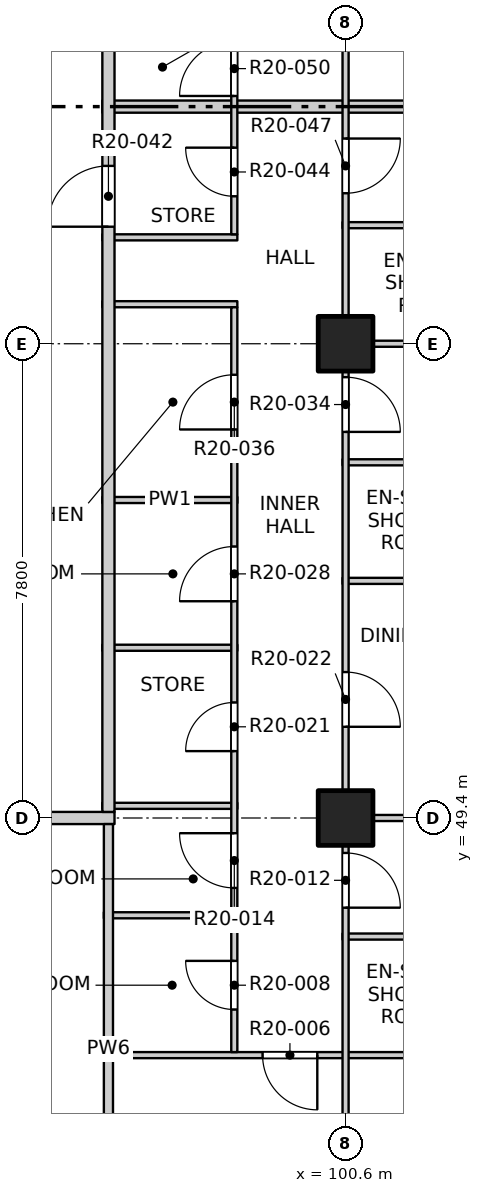
"""IFC4 building model, lengths in metres.
Left out: names, types, materials, properties, quantities, classifications, styles, units other than length and angle.
Written with IfcOpenShell. Run it as: python <this file> out.ifc"""

import sys

from ifc_helpers import new_model, si_unit, direction, frame, frame_2d, origin, origin_2d, place, context, subcontext, project, spatial, rectangle, extrude, element, fill, save


model = new_model("IFC4")
c1 = context("Model", 3, precision=1e-05, world=origin(), true_north=direction((0.0, 1.0)))
c2 = subcontext(c1, "Body", "Model", "MODEL_VIEW")
j1 = project(units=[si_unit("LENGTHUNIT", "METRE"), si_unit("PLANEANGLEUNIT", "RADIAN")], contexts=[c1])
p1 = place(None, origin())
s1 = spatial("IfcSite", under=j1, at=p1, CompositionType="ELEMENT")
p2 = place(p1, origin())
s2 = spatial("IfcBuilding", under=s1, at=p2, CompositionType="ELEMENT")
p3 = place(p2, frame((0.0, 0.0, 204.1)))
s3 = spatial("IfcBuildingStorey", under=s2, at=p3, CompositionType="ELEMENT", Elevation=204.1)
for number, where, z_axis, x_axis in (
    (1, (100.6, 49.4, -0.25), (0.0, 0.0, 1.0), (1.0, 0.0, 0.0)),
    (2, (100.6, 57.2, -0.25), (0.0, 0.0, 1.0), (1.0, 0.0, 0.0)),
):
    element("IfcColumn", number, at=place(p3, frame(where, z_axis=z_axis, x_axis=x_axis)), inside=s3, PredefinedType="COLUMN", context=c2, shape_type="SweptSolid", body=[
        extrude(rectangle(XDim=0.9, YDim=0.9, at=origin_2d()), origin(), (0.0, 0.0, 1.0), 3.4),
    ])
p4 = place(p3, frame((96.625, 45.5, 0.0), z_axis=(0.0, 0.0, 1.0), x_axis=(1.0, 0.0, 0.0)))
e3 = element("IfcWall", 3, at=p4, inside=s3, PredefinedType="PARTITIONING", context=c2, shape_type="SweptSolid", body=[
    extrude(rectangle(XDim=11.475, YDim=0.1, at=frame_2d((5.738, 0.0))), origin(), (0.0, 0.0, 1.0), 3.15),
])
p5 = place(p4, frame((2.61, 0.0, 0.0)))
e4 = element("IfcOpeningElement", 4, at=p5, cuts=e3, PredefinedType="OPENING", context=c2, shape_type="SweptSolid", body=[
    extrude(rectangle(XDim=0.9, YDim=2.1, at=frame_2d((0.45, 1.05))), frame((0.0, 0.06, 0.0), z_axis=(0.0, -1.0, 0.0), x_axis=(1.0, 0.0, 0.0)), (0.0, 0.0, 1.0), 0.12),
])
p6 = place(p3, frame((100.55, 47.45, 0.0), z_axis=(0.0, 0.0, 1.0), x_axis=(1.0, 0.0, 0.0)))
e5 = element("IfcWall", 5, at=p6, inside=s3, PredefinedType="PARTITIONING", context=c2, shape_type="SweptSolid", body=[
    extrude(rectangle(XDim=3.4, YDim=0.1, at=frame_2d((1.7, 0.0))), origin(), (0.0, 0.0, 1.0), 3.15),
])
p7 = place(p3, frame((96.625, 47.8, 0.0), z_axis=(0.0, 0.0, 1.0), x_axis=(1.0, 0.0, 0.0)))
e6 = element("IfcWall", 6, at=p7, inside=s3, PredefinedType="PARTITIONING", context=c2, shape_type="SweptSolid", body=[
    extrude(rectangle(XDim=2.195, YDim=0.1, at=frame_2d((1.098, 0.0))), origin(), (0.0, 0.0, 1.0), 3.15),
])
p8 = place(p3, frame((73.2, 49.4, 0.0), z_axis=(0.0, 0.0, 1.0), x_axis=(1.0, 0.0, 0.0)))
e7 = element("IfcWall", 7, at=p8, inside=s3, PredefinedType="PARTITIONING", context=c2, shape_type="SweptSolid", body=[
    extrude(rectangle(XDim=23.6, YDim=0.2, at=frame_2d((11.8, 0.0))), origin(), (0.0, 0.0, 1.0), 3.15),
])
p9 = place(p8, frame((1.6, 0.0, 0.0)))
e8 = element("IfcOpeningElement", 8, at=p9, cuts=e7, PredefinedType="OPENING", context=c2, shape_type="SweptSolid", body=[
    extrude(rectangle(XDim=0.9, YDim=2.1, at=frame_2d((0.45, 1.05))), frame((0.0, 0.11, 0.0), z_axis=(0.0, -1.0, 0.0), x_axis=(1.0, 0.0, 0.0)), (0.0, 0.0, 1.0), 0.22),
])
p10 = place(p8, frame((5.5, 0.0, 0.0)))
e9 = element("IfcOpeningElement", 9, at=p10, cuts=e7, PredefinedType="OPENING", context=c2, shape_type="SweptSolid", body=[
    extrude(rectangle(XDim=0.9, YDim=2.1, at=frame_2d((0.45, 1.05))), frame((0.0, 0.11, 0.0), z_axis=(0.0, -1.0, 0.0), x_axis=(1.0, 0.0, 0.0)), (0.0, 0.0, 1.0), 0.22),
])
p11 = place(p8, frame((12.375, 0.0, 0.0)))
e10 = element("IfcOpeningElement", 10, at=p11, cuts=e7, PredefinedType="OPENING", context=c2, shape_type="SweptSolid", body=[
    extrude(rectangle(XDim=1.2, YDim=2.1, at=frame_2d((0.6, 1.05))), frame((0.0, 0.11, 0.0), z_axis=(0.0, -1.0, 0.0), x_axis=(1.0, 0.0, 0.0)), (0.0, 0.0, 1.0), 0.22),
])
p12 = place(p8, frame((20.15, 0.0, 0.0)))
e11 = element("IfcOpeningElement", 11, at=p12, cuts=e7, PredefinedType="OPENING", context=c2, shape_type="SweptSolid", body=[
    extrude(rectangle(XDim=1.2, YDim=2.1, at=frame_2d((0.6, 1.05))), frame((0.0, 0.11, 0.0), z_axis=(0.0, -1.0, 0.0), x_axis=(1.0, 0.0, 0.0)), (0.0, 0.0, 1.0), 0.22),
])
p13 = place(p3, frame((100.55, 49.4, 0.0), z_axis=(0.0, 0.0, 1.0), x_axis=(1.0, 0.0, 0.0)))
e12 = element("IfcWall", 12, at=p13, inside=s3, PredefinedType="PARTITIONING", context=c2, shape_type="SweptSolid", body=[
    extrude(rectangle(XDim=7.55, YDim=0.1, at=frame_2d((3.775, 0.0))), origin(), (0.0, 0.0, 1.0), 3.15),
])
for number, where, z_axis, x_axis in (
    (13, (96.6, 49.6, 0.0), (0.0, 0.0, 1.0), (1.0, 0.0, 0.0)),
    (14, (96.6, 52.2, 0.0), (0.0, 0.0, 1.0), (1.0, 0.0, 0.0)),
):
    element("IfcWall", number, at=place(p3, frame(where, z_axis=z_axis, x_axis=x_axis)), inside=s3, PredefinedType="PARTITIONING", context=c2, shape_type="SweptSolid", body=[
        extrude(rectangle(XDim=2.22, YDim=0.1, at=frame_2d((1.11, 0.0))), origin(), (0.0, 0.0, 1.0), 3.15),
    ])
p14 = place(p3, frame((100.55, 53.3, 0.0), z_axis=(0.0, 0.0, 1.0), x_axis=(1.0, 0.0, 0.0)))
e15 = element("IfcWall", 15, at=p14, inside=s3, PredefinedType="PARTITIONING", context=c2, shape_type="SweptSolid", body=[
    extrude(rectangle(XDim=7.55, YDim=0.1, at=frame_2d((3.775, 0.0))), origin(), (0.0, 0.0, 1.0), 3.15),
])
p15 = place(p3, frame((96.6, 54.63, 0.0), z_axis=(0.0, 0.0, 1.0), x_axis=(1.0, 0.0, 0.0)))
e16 = element("IfcWall", 16, at=p15, inside=s3, PredefinedType="PARTITIONING", context=c2, shape_type="SweptSolid", body=[
    extrude(rectangle(XDim=2.22, YDim=0.1, at=frame_2d((1.11, 0.0))), origin(), (0.0, 0.0, 1.0), 3.15),
])
p16 = place(p3, frame((100.55, 55.25, 0.0), z_axis=(0.0, 0.0, 1.0), x_axis=(1.0, 0.0, 0.0)))
e17 = element("IfcWall", 17, at=p16, inside=s3, PredefinedType="PARTITIONING", context=c2, shape_type="SweptSolid", body=[
    extrude(rectangle(XDim=3.4, YDim=0.1, at=frame_2d((1.7, 0.0))), origin(), (0.0, 0.0, 1.0), 3.15),
])
p17 = place(p3, frame((100.55, 57.2, 0.0), z_axis=(0.0, 0.0, 1.0), x_axis=(1.0, 0.0, 0.0)))
e18 = element("IfcWall", 18, at=p17, inside=s3, PredefinedType="PARTITIONING", context=c2, shape_type="SweptSolid", body=[
    extrude(rectangle(XDim=7.55, YDim=0.1, at=frame_2d((3.775, 0.0))), origin(), (0.0, 0.0, 1.0), 3.15),
])
for number, where, z_axis, x_axis in (
    (19, (96.6, 57.85, 0.0), (0.0, 0.0, 1.0), (1.0, 0.0, 0.0)),
    (20, (96.6, 58.95, 0.0), (0.0, 0.0, 1.0), (1.0, 0.0, 0.0)),
):
    element("IfcWall", number, at=place(p3, frame(where, z_axis=z_axis, x_axis=x_axis)), inside=s3, PredefinedType="PARTITIONING", context=c2, shape_type="SweptSolid", body=[
        extrude(rectangle(XDim=2.22, YDim=0.1, at=frame_2d((1.11, 0.0))), origin(), (0.0, 0.0, 1.0), 3.15),
    ])
p18 = place(p3, frame((100.55, 59.15, 0.0), z_axis=(0.0, 0.0, 1.0), x_axis=(1.0, 0.0, 0.0)))
e21 = element("IfcWall", 21, at=p18, inside=s3, PredefinedType="PARTITIONING", context=c2, shape_type="SweptSolid", body=[
    extrude(rectangle(XDim=3.4, YDim=0.1, at=frame_2d((1.7, 0.0))), origin(), (0.0, 0.0, 1.0), 3.15),
])
p19 = place(p3, frame((96.6, 61.1, 0.0), z_axis=(0.0, 0.0, 1.0), x_axis=(1.0, 0.0, 0.0)))
e22 = element("IfcWall", 22, at=p19, inside=s3, PredefinedType="PARTITIONING", context=c2, shape_type="SweptSolid", body=[
    extrude(rectangle(XDim=11.5, YDim=0.2, at=frame_2d((5.75, 0.0))), origin(), (0.0, 0.0, 1.0), 2.55),
])
p20 = place(p3, frame((96.7, 41.9, 0.0), z_axis=(0.0, 0.0, 1.0), x_axis=(0.0, 1.0, 0.0)))
e23 = element("IfcWall", 23, at=p20, inside=s3, PredefinedType="PARTITIONING", context=c2, shape_type="SweptSolid", body=[
    extrude(rectangle(XDim=7.4, YDim=0.15, at=frame_2d((3.7, 0.0))), origin(), (0.0, 0.0, 1.0), 3.15),
])
p21 = place(p3, frame((96.7, 49.5, 0.0), z_axis=(0.0, 0.0, 1.0), x_axis=(0.0, 1.0, 0.0)))
e24 = element("IfcWall", 24, at=p21, inside=s3, PredefinedType="PARTITIONING", context=c2, shape_type="SweptSolid", body=[
    extrude(rectangle(XDim=34.9, YDim=0.2, at=frame_2d((17.45, 0.0))), origin(), (0.0, 0.0, 1.0), 3.15),
])
p22 = place(p21, frame((9.625, 0.0, 0.0)))
e25 = element("IfcOpeningElement", 25, at=p22, cuts=e24, PredefinedType="OPENING", context=c2, shape_type="SweptSolid", body=[
    extrude(rectangle(XDim=1.0, YDim=2.1, at=frame_2d((0.5, 1.05))), frame((0.0, 0.11, 0.0), z_axis=(0.0, -1.0, 0.0), x_axis=(1.0, 0.0, 0.0)), (0.0, 0.0, 1.0), 0.22),
])
p23 = place(p21, frame((14.125, 0.0, 0.0)))
e26 = element("IfcOpeningElement", 26, at=p23, cuts=e24, PredefinedType="OPENING", context=c2, shape_type="SweptSolid", body=[
    extrude(rectangle(XDim=1.0, YDim=2.1, at=frame_2d((0.5, 1.05))), frame((0.0, 0.11, 0.0), z_axis=(0.0, -1.0, 0.0), x_axis=(1.0, 0.0, 0.0)), (0.0, 0.0, 1.0), 0.22),
])
p24 = place(p21, frame((29.275, 0.0, 0.0)))
e27 = element("IfcOpeningElement", 27, at=p24, cuts=e24, PredefinedType="OPENING", context=c2, shape_type="SweptSolid", body=[
    extrude(rectangle(XDim=1.0, YDim=2.1, at=frame_2d((0.5, 1.05))), frame((0.0, 0.11, 0.0), z_axis=(0.0, -1.0, 0.0), x_axis=(1.0, 0.0, 0.0)), (0.0, 0.0, 1.0), 0.22),
])
p25 = place(p3, frame((98.77, 45.55, 0.0), z_axis=(0.0, 0.0, 1.0), x_axis=(0.0, 1.0, 0.0)))
e28 = element("IfcWall", 28, at=p25, inside=s3, PredefinedType="PARTITIONING", context=c2, shape_type="SweptSolid", body=[
    extrude(rectangle(XDim=12.25, YDim=0.1, at=frame_2d((6.125, 0.0))), origin(), (0.0, 0.0, 1.0), 3.15),
])
p26 = place(p25, frame((0.7, 0.0, 0.0)))
e29 = element("IfcOpeningElement", 29, at=p26, cuts=e28, PredefinedType="OPENING", context=c2, shape_type="SweptSolid", body=[
    extrude(rectangle(XDim=0.8, YDim=2.1, at=frame_2d((0.4, 1.05))), frame((0.0, 0.06, 0.0), z_axis=(0.0, -1.0, 0.0), x_axis=(1.0, 0.0, 0.0)), (0.0, 0.0, 1.0), 0.12),
])
p27 = place(p25, frame((2.7, 0.0, 0.0)))
e30 = element("IfcOpeningElement", 30, at=p27, cuts=e28, PredefinedType="OPENING", context=c2, shape_type="SweptSolid", body=[
    extrude(rectangle(XDim=0.9, YDim=2.1, at=frame_2d((0.45, 1.05))), frame((0.0, 0.06, 0.0), z_axis=(0.0, -1.0, 0.0), x_axis=(1.0, 0.0, 0.0)), (0.0, 0.0, 1.0), 0.12),
])
p28 = place(p25, frame((4.95, 0.0, 0.0)))
e31 = element("IfcOpeningElement", 31, at=p28, cuts=e28, PredefinedType="OPENING", context=c2, shape_type="SweptSolid", body=[
    extrude(rectangle(XDim=0.8, YDim=2.1, at=frame_2d((0.4, 1.05))), frame((0.0, 0.06, 0.0), z_axis=(0.0, -1.0, 0.0), x_axis=(1.0, 0.0, 0.0)), (0.0, 0.0, 1.0), 0.12),
])
p29 = place(p25, frame((7.415, 0.0, 0.0)))
e32 = element("IfcOpeningElement", 32, at=p29, cuts=e28, PredefinedType="OPENING", context=c2, shape_type="SweptSolid", body=[
    extrude(rectangle(XDim=0.9, YDim=2.1, at=frame_2d((0.45, 1.05))), frame((0.0, 0.06, 0.0), z_axis=(0.0, -1.0, 0.0), x_axis=(1.0, 0.0, 0.0)), (0.0, 0.0, 1.0), 0.12),
])
p30 = place(p25, frame((10.24, 0.0, 0.0)))
e33 = element("IfcOpeningElement", 33, at=p30, cuts=e28, PredefinedType="OPENING", context=c2, shape_type="SweptSolid", body=[
    extrude(rectangle(XDim=0.9, YDim=2.1, at=frame_2d((0.45, 1.05))), frame((0.0, 0.06, 0.0), z_axis=(0.0, -1.0, 0.0), x_axis=(1.0, 0.0, 0.0)), (0.0, 0.0, 1.0), 0.12),
])
p31 = place(p3, frame((98.77, 59.0, 0.0), z_axis=(0.0, 0.0, 1.0), x_axis=(0.0, 1.0, 0.0)))
e34 = element("IfcWall", 34, at=p31, inside=s3, PredefinedType="PARTITIONING", context=c2, shape_type="SweptSolid", body=[
    extrude(rectangle(XDim=3.3, YDim=0.1, at=frame_2d((1.65, 0.0))), origin(), (0.0, 0.0, 1.0), 3.15),
])
p32 = place(p31, frame((0.625, 0.0, 0.0)))
e35 = element("IfcOpeningElement", 35, at=p32, cuts=e34, PredefinedType="OPENING", context=c2, shape_type="SweptSolid", body=[
    extrude(rectangle(XDim=0.8, YDim=2.1, at=frame_2d((0.4, 1.05))), frame((0.0, 0.06, 0.0), z_axis=(0.0, -1.0, 0.0), x_axis=(1.0, 0.0, 0.0)), (0.0, 0.0, 1.0), 0.12),
])
p33 = place(p31, frame((2.275, 0.0, 0.0)))
e36 = element("IfcOpeningElement", 36, at=p33, cuts=e34, PredefinedType="OPENING", context=c2, shape_type="SweptSolid", body=[
    extrude(rectangle(XDim=0.9, YDim=2.1, at=frame_2d((0.45, 1.05))), frame((0.0, 0.06, 0.0), z_axis=(0.0, -1.0, 0.0), x_axis=(1.0, 0.0, 0.0)), (0.0, 0.0, 1.0), 0.12),
])
p34 = place(p3, frame((100.6, 41.9, 0.0), z_axis=(0.0, 0.0, 1.0), x_axis=(0.0, 1.0, 0.0)))
e37 = element("IfcWall", 37, at=p34, inside=s3, PredefinedType="PARTITIONING", context=c2, shape_type="SweptSolid", body=[
    extrude(rectangle(XDim=46.2, YDim=0.1, at=frame_2d((23.1, 0.0))), origin(), (0.0, 0.0, 1.0), 3.15),
])
p35 = place(p34, frame((1.2, 0.0, 0.0)))
e38 = element("IfcOpeningElement", 38, at=p35, cuts=e37, PredefinedType="OPENING", context=c2, shape_type="SweptSolid", body=[
    extrude(rectangle(XDim=0.9, YDim=2.1, at=frame_2d((0.45, 1.05))), frame((0.0, 0.06, 0.0), z_axis=(0.0, -1.0, 0.0), x_axis=(1.0, 0.0, 0.0)), (0.0, 0.0, 1.0), 0.12),
])
p36 = place(p34, frame((6.025, 0.0, 0.0)))
e39 = element("IfcOpeningElement", 39, at=p36, cuts=e37, PredefinedType="OPENING", context=c2, shape_type="SweptSolid", body=[
    extrude(rectangle(XDim=0.9, YDim=2.1, at=frame_2d((0.45, 1.05))), frame((0.0, 0.06, 0.0), z_axis=(0.0, -1.0, 0.0), x_axis=(1.0, 0.0, 0.0)), (0.0, 0.0, 1.0), 0.12),
])
p37 = place(p34, frame((9.0, 0.0, 0.0)))
e40 = element("IfcOpeningElement", 40, at=p37, cuts=e37, PredefinedType="OPENING", context=c2, shape_type="SweptSolid", body=[
    extrude(rectangle(XDim=0.9, YDim=2.1, at=frame_2d((0.45, 1.05))), frame((0.0, 0.06, 0.0), z_axis=(0.0, -1.0, 0.0), x_axis=(1.0, 0.0, 0.0)), (0.0, 0.0, 1.0), 0.12),
])
p38 = place(p34, frame((13.85, 0.0, 0.0)))
e41 = element("IfcOpeningElement", 41, at=p38, cuts=e37, PredefinedType="OPENING", context=c2, shape_type="SweptSolid", body=[
    extrude(rectangle(XDim=0.9, YDim=2.1, at=frame_2d((0.45, 1.05))), frame((0.0, 0.06, 0.0), z_axis=(0.0, -1.0, 0.0), x_axis=(1.0, 0.0, 0.0)), (0.0, 0.0, 1.0), 0.12),
])
p39 = place(p34, frame((17.775, 0.0, 0.0)))
e42 = element("IfcOpeningElement", 42, at=p39, cuts=e37, PredefinedType="OPENING", context=c2, shape_type="SweptSolid", body=[
    extrude(rectangle(XDim=0.9, YDim=2.1, at=frame_2d((0.45, 1.05))), frame((0.0, 0.06, 0.0), z_axis=(0.0, -1.0, 0.0), x_axis=(1.0, 0.0, 0.0)), (0.0, 0.0, 1.0), 0.12),
])
p40 = place(p34, frame((20.7, 0.0, 0.0)))
e43 = element("IfcOpeningElement", 43, at=p40, cuts=e37, PredefinedType="OPENING", context=c2, shape_type="SweptSolid", body=[
    extrude(rectangle(XDim=0.9, YDim=2.1, at=frame_2d((0.45, 1.05))), frame((0.0, 0.06, 0.0), z_axis=(0.0, -1.0, 0.0), x_axis=(1.0, 0.0, 0.0)), (0.0, 0.0, 1.0), 0.12),
])
p41 = place(p34, frame((24.6, 0.0, 0.0)))
e44 = element("IfcOpeningElement", 44, at=p41, cuts=e37, PredefinedType="OPENING", context=c2, shape_type="SweptSolid", body=[
    extrude(rectangle(XDim=0.9, YDim=2.1, at=frame_2d((0.45, 1.05))), frame((0.0, 0.06, 0.0), z_axis=(0.0, -1.0, 0.0), x_axis=(1.0, 0.0, 0.0)), (0.0, 0.0, 1.0), 0.12),
])
p42 = place(p34, frame((29.425, 0.0, 0.0)))
e45 = element("IfcOpeningElement", 45, at=p42, cuts=e37, PredefinedType="OPENING", context=c2, shape_type="SweptSolid", body=[
    extrude(rectangle(XDim=0.9, YDim=2.1, at=frame_2d((0.45, 1.05))), frame((0.0, 0.06, 0.0), z_axis=(0.0, -1.0, 0.0), x_axis=(1.0, 0.0, 0.0)), (0.0, 0.0, 1.0), 0.12),
])
p43 = place(p34, frame((33.375, 0.0, 0.0)))
e46 = element("IfcOpeningElement", 46, at=p43, cuts=e37, PredefinedType="OPENING", context=c2, shape_type="SweptSolid", body=[
    extrude(rectangle(XDim=0.9, YDim=2.1, at=frame_2d((0.45, 1.05))), frame((0.0, 0.06, 0.0), z_axis=(0.0, -1.0, 0.0), x_axis=(1.0, 0.0, 0.0)), (0.0, 0.0, 1.0), 0.12),
])
p44 = place(p34, frame((36.3, 0.0, 0.0)))
e47 = element("IfcOpeningElement", 47, at=p44, cuts=e37, PredefinedType="OPENING", context=c2, shape_type="SweptSolid", body=[
    extrude(rectangle(XDim=0.9, YDim=2.1, at=frame_2d((0.45, 1.05))), frame((0.0, 0.06, 0.0), z_axis=(0.0, -1.0, 0.0), x_axis=(1.0, 0.0, 0.0)), (0.0, 0.0, 1.0), 0.12),
])
p45 = place(p34, frame((41.175, 0.0, 0.0)))
e48 = element("IfcOpeningElement", 48, at=p45, cuts=e37, PredefinedType="OPENING", context=c2, shape_type="SweptSolid", body=[
    extrude(rectangle(XDim=0.9, YDim=2.1, at=frame_2d((0.45, 1.05))), frame((0.0, 0.06, 0.0), z_axis=(0.0, -1.0, 0.0), x_axis=(1.0, 0.0, 0.0)), (0.0, 0.0, 1.0), 0.12),
])
p46 = place(p34, frame((44.1, 0.0, 0.0)))
e49 = element("IfcOpeningElement", 49, at=p46, cuts=e37, PredefinedType="OPENING", context=c2, shape_type="SweptSolid", body=[
    extrude(rectangle(XDim=0.9, YDim=2.1, at=frame_2d((0.45, 1.05))), frame((0.0, 0.06, 0.0), z_axis=(0.0, -1.0, 0.0), x_axis=(1.0, 0.0, 0.0)), (0.0, 0.0, 1.0), 0.12),
])
p47 = place(p5, origin())
e50 = element("IfcDoor", 50, at=p47, inside=s3, OperationType="SINGLE_SWING_LEFT", PredefinedType="DOOR", context=c2, shape_type="SweptSolid", body=[
    extrude(rectangle(XDim=0.9, YDim=2.1, at=frame_2d((0.45, 1.05))), frame((0.0, 0.025, 0.0), z_axis=(0.0, -1.0, 0.0), x_axis=(1.0, 0.0, 0.0)), (0.0, 0.0, 1.0), 0.05),
])
fill(e4, e50)
p48 = place(p26, origin())
e51 = element("IfcDoor", 51, at=p48, inside=s3, OperationType="SINGLE_SWING_RIGHT", PredefinedType="DOOR", context=c2, shape_type="SweptSolid", body=[
    extrude(rectangle(XDim=0.8, YDim=2.1, at=frame_2d((0.4, 1.05))), frame((0.0, 0.025, 0.0), z_axis=(0.0, -1.0, 0.0), x_axis=(1.0, 0.0, 0.0)), (0.0, 0.0, 1.0), 0.05),
])
fill(e29, e51)
p49 = place(p36, origin())
e52 = element("IfcDoor", 52, at=p49, inside=s3, OperationType="SINGLE_SWING_RIGHT", PredefinedType="DOOR", context=c2, shape_type="SweptSolid", body=[
    extrude(rectangle(XDim=0.9, YDim=2.1, at=frame_2d((0.45, 1.05))), frame((0.0, 0.025, 0.0), z_axis=(0.0, -1.0, 0.0), x_axis=(1.0, 0.0, 0.0)), (0.0, 0.0, 1.0), 0.05),
])
fill(e39, e52)
p50 = place(p27, origin())
e53 = element("IfcDoor", 53, at=p50, inside=s3, OperationType="SINGLE_SWING_RIGHT", PredefinedType="DOOR", context=c2, shape_type="SweptSolid", body=[
    extrude(rectangle(XDim=0.9, YDim=2.1, at=frame_2d((0.45, 1.05))), frame((0.0, 0.025, 0.0), z_axis=(0.0, -1.0, 0.0), x_axis=(1.0, 0.0, 0.0)), (0.0, 0.0, 1.0), 0.05),
])
fill(e30, e53)
p51 = place(p28, origin())
e54 = element("IfcDoor", 54, at=p51, inside=s3, OperationType="SINGLE_SWING_LEFT", PredefinedType="DOOR", context=c2, shape_type="SweptSolid", body=[
    extrude(rectangle(XDim=0.8, YDim=2.1, at=frame_2d((0.4, 1.05))), frame((0.0, 0.025, 0.0), z_axis=(0.0, -1.0, 0.0), x_axis=(1.0, 0.0, 0.0)), (0.0, 0.0, 1.0), 0.05),
])
fill(e31, e54)
p52 = place(p37, origin())
e55 = element("IfcDoor", 55, at=p52, inside=s3, OperationType="SINGLE_SWING_RIGHT", PredefinedType="DOOR", context=c2, shape_type="SweptSolid", body=[
    extrude(rectangle(XDim=0.9, YDim=2.1, at=frame_2d((0.45, 1.05))), frame((0.0, 0.025, 0.0), z_axis=(0.0, -1.0, 0.0), x_axis=(1.0, 0.0, 0.0)), (0.0, 0.0, 1.0), 0.05),
])
fill(e40, e55)
p53 = place(p29, origin())
e56 = element("IfcDoor", 56, at=p53, inside=s3, OperationType="SINGLE_SWING_LEFT", PredefinedType="DOOR", context=c2, shape_type="SweptSolid", body=[
    extrude(rectangle(XDim=0.9, YDim=2.1, at=frame_2d((0.45, 1.05))), frame((0.0, 0.025, 0.0), z_axis=(0.0, -1.0, 0.0), x_axis=(1.0, 0.0, 0.0)), (0.0, 0.0, 1.0), 0.05),
])
fill(e32, e56)
p54 = place(p38, origin())
e57 = element("IfcDoor", 57, at=p54, inside=s3, OperationType="SINGLE_SWING_RIGHT", PredefinedType="DOOR", context=c2, shape_type="SweptSolid", body=[
    extrude(rectangle(XDim=0.9, YDim=2.1, at=frame_2d((0.45, 1.05))), frame((0.0, 0.025, 0.0), z_axis=(0.0, -1.0, 0.0), x_axis=(1.0, 0.0, 0.0)), (0.0, 0.0, 1.0), 0.05),
])
fill(e41, e57)
p55 = place(p30, origin())
e58 = element("IfcDoor", 58, at=p55, inside=s3, OperationType="SINGLE_SWING_LEFT", PredefinedType="DOOR", context=c2, shape_type="SweptSolid", body=[
    extrude(rectangle(XDim=0.9, YDim=2.1, at=frame_2d((0.45, 1.05))), frame((0.0, 0.025, 0.0), z_axis=(0.0, -1.0, 0.0), x_axis=(1.0, 0.0, 0.0)), (0.0, 0.0, 1.0), 0.05),
])
fill(e33, e58)
p56 = place(p22, origin())
e59 = element("IfcDoor", 59, at=p56, inside=s3, OperationType="SINGLE_SWING_LEFT", PredefinedType="DOOR", context=c2, shape_type="SweptSolid", body=[
    extrude(rectangle(XDim=1.0, YDim=2.1, at=frame_2d((0.5, 1.05))), frame((0.0, 0.025, 0.0), z_axis=(0.0, -1.0, 0.0), x_axis=(1.0, 0.0, 0.0)), (0.0, 0.0, 1.0), 0.05),
])
fill(e25, e59)
p57 = place(p32, origin())
e60 = element("IfcDoor", 60, at=p57, inside=s3, OperationType="SINGLE_SWING_RIGHT", PredefinedType="DOOR", context=c2, shape_type="SweptSolid", body=[
    extrude(rectangle(XDim=0.8, YDim=2.1, at=frame_2d((0.4, 1.05))), frame((0.0, 0.025, 0.0), z_axis=(0.0, -1.0, 0.0), x_axis=(1.0, 0.0, 0.0)), (0.0, 0.0, 1.0), 0.05),
])
fill(e35, e60)
p58 = place(p39, origin())
e61 = element("IfcDoor", 61, at=p58, inside=s3, OperationType="SINGLE_SWING_LEFT", PredefinedType="DOOR", context=c2, shape_type="SweptSolid", body=[
    extrude(rectangle(XDim=0.9, YDim=2.1, at=frame_2d((0.45, 1.05))), frame((0.0, 0.025, 0.0), z_axis=(0.0, -1.0, 0.0), x_axis=(1.0, 0.0, 0.0)), (0.0, 0.0, 1.0), 0.05),
])
fill(e42, e61)
p59 = place(p33, origin())
e62 = element("IfcDoor", 62, at=p59, inside=s3, OperationType="SINGLE_SWING_LEFT", PredefinedType="DOOR", context=c2, shape_type="SweptSolid", body=[
    extrude(rectangle(XDim=0.9, YDim=2.1, at=frame_2d((0.45, 1.05))), frame((0.0, 0.025, 0.0), z_axis=(0.0, -1.0, 0.0), x_axis=(1.0, 0.0, 0.0)), (0.0, 0.0, 1.0), 0.05),
])
fill(e36, e62)
save(model, sys.argv[1])
